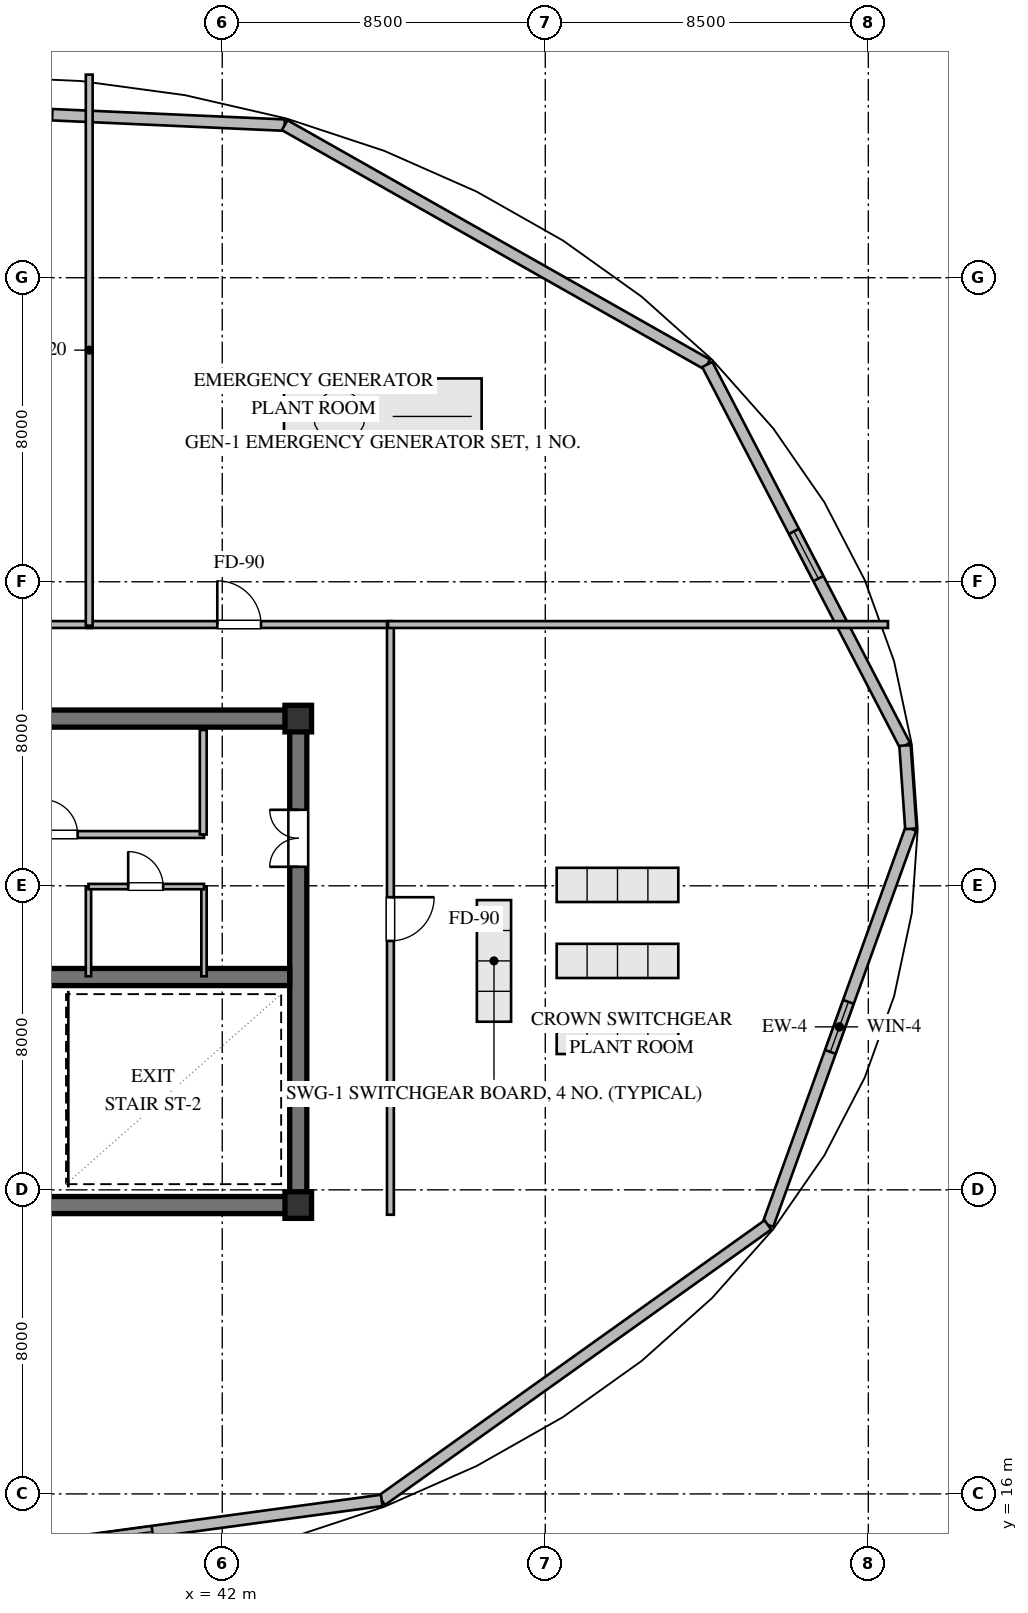
"""IFC4 building model, lengths in metres.
Left out: names, types, materials, properties, quantities, classifications, styles, units other than length and angle.
Written with IfcOpenShell. Run it as: python <this file> out.ifc"""

import sys

from ifc_helpers import new_model, si_unit, direction, frame, frame_2d, origin, origin_2d, place, context, subcontext, project, spatial, rectangle, extrude, element, fill, save


model = new_model("IFC4")
c1 = context("Model", 3, precision=1e-05, world=origin(), true_north=direction((0.0, 1.0)))
c2 = subcontext(c1, "Body", "Model", "MODEL_VIEW")
j1 = project(units=[si_unit("LENGTHUNIT", "METRE"), si_unit("PLANEANGLEUNIT", "RADIAN")], contexts=[c1])
p1 = place(None, origin())
s1 = spatial("IfcSite", under=j1, at=p1, CompositionType="ELEMENT")
p2 = place(p1, origin())
s2 = spatial("IfcBuilding", under=s1, at=p2, CompositionType="ELEMENT")
p3 = place(p2, frame((0.0, 0.0, 308.8)))
s3 = spatial("IfcBuildingStorey", under=s2, at=p3, CompositionType="ELEMENT", Elevation=308.8)
for number, where, z_axis, x_axis in (
    (1, (21.775, 23.6, 0.0), (0.0, 0.0, 1.0), (1.0, 0.0, 0.0)),
    (2, (21.775, 36.4, 0.0), (0.0, 0.0, 1.0), (1.0, 0.0, 0.0)),
):
    element("IfcWall", number, at=place(p3, frame(where, z_axis=z_axis, x_axis=x_axis)), inside=s3, PredefinedType="SHEAR", context=c2, shape_type="SweptSolid", body=[
        extrude(rectangle(XDim=22.45, YDim=0.45, at=frame_2d((11.225, 0.0))), origin(), (0.0, 0.0, 1.0), 3.7),
    ])
p4 = place(p3, frame((44.0, 23.825, 0.0), z_axis=(0.0, 0.0, 1.0), x_axis=(0.0, 1.0, 0.0)))
e3 = element("IfcWall", 3, at=p4, inside=s3, PredefinedType="SHEAR", context=c2, shape_type="SweptSolid", body=[
    extrude(rectangle(XDim=12.35, YDim=0.45, at=frame_2d((6.175, 0.0))), origin(), (0.0, 0.0, 1.0), 3.7),
])
p5 = place(p4, frame((8.675, 0.0, 0.0)))
e4 = element("IfcOpeningElement", 4, at=p5, cuts=e3, PredefinedType="OPENING", context=c2, shape_type="SweptSolid", body=[
    extrude(rectangle(XDim=1.5, YDim=2.15, at=frame_2d((0.75, 1.075))), frame((0.0, 0.235, 0.0), z_axis=(0.0, -1.0, 0.0), x_axis=(1.0, 0.0, 0.0)), (0.0, 0.0, 1.0), 0.47),
])
p6 = place(p3, frame((22.225, 29.6, 0.0), z_axis=(0.0, 0.0, 1.0), x_axis=(1.0, 0.0, 0.0)))
e5 = element("IfcWall", 5, at=p6, inside=s3, PredefinedType="SHEAR", context=c2, shape_type="SweptSolid", body=[
    extrude(rectangle(XDim=21.55, YDim=0.45, at=frame_2d((10.775, 0.0))), origin(), (0.0, 0.0, 1.0), 3.7),
])
p7 = place(p6, frame((12.225, 0.0, 0.0)))
e6 = element("IfcOpeningElement", 6, at=p7, cuts=e5, PredefinedType="OPENING", context=c2, shape_type="SweptSolid", body=[
    extrude(rectangle(XDim=1.15, YDim=2.1, at=frame_2d((0.575, 1.05))), frame((0.0, 0.235, 0.0), z_axis=(0.0, -1.0, 0.0), x_axis=(1.0, 0.0, 0.0)), (0.0, 0.0, 1.0), 0.47),
])
for number, where, z_axis, x_axis in (
    (7, (44.0, 23.6, 0.0), (0.0, 0.0, 1.0), (1.0, 0.0, 0.0)),
    (8, (44.0, 36.4, 0.0), (0.0, 0.0, 1.0), (1.0, 0.0, 0.0)),
):
    element("IfcColumn", number, at=place(p3, frame(where, z_axis=z_axis, x_axis=x_axis)), inside=s3, PredefinedType="COLUMN", context=c2, shape_type="SweptSolid", body=[
        extrude(rectangle(XDim=0.7, YDim=0.7, at=origin_2d()), origin(), (0.0, 0.0, 1.0), 4.0),
    ])
p8 = place(p3, frame((60.12, 33.5, 0.0), z_axis=(0.0, 0.0, 1.0), x_axis=(-0.339587618367, -0.940574425259, 0.0)))
e9 = element("IfcWall", 9, at=p8, inside=s3, PredefinedType="STANDARD", context=c2, shape_type="SweptSolid", body=[
    extrude(rectangle(XDim=11.082, YDim=0.3, at=frame_2d((5.541, 0.0))), origin(), (0.0, 0.0, 1.0), 3.7),
])
p9 = place(p8, frame((4.841, 0.0, 1.2)))
e10 = element("IfcOpeningElement", 10, at=p9, cuts=e9, PredefinedType="OPENING", context=c2, shape_type="SweptSolid", body=[
    extrude(rectangle(XDim=1.4, YDim=1.2, at=frame_2d((0.7, 0.6))), frame((0.0, 0.16, 0.0), z_axis=(0.0, -1.0, 0.0), x_axis=(1.0, 0.0, 0.0)), (0.0, 0.0, 1.0), 0.32),
])
p10 = place(p3, frame((56.357, 23.077, 0.0), z_axis=(0.0, 0.0, 1.0), x_axis=(-0.814111303181, -0.580708865123, 0.0)))
e11 = element("IfcWall", 11, at=p10, inside=s3, PredefinedType="STANDARD", context=c2, shape_type="SweptSolid", body=[
    extrude(rectangle(XDim=12.481, YDim=0.3, at=frame_2d((6.24, 0.0))), origin(), (0.0, 0.0, 1.0), 3.7),
])
p11 = place(p3, frame((46.196, 15.829, 0.0), z_axis=(0.0, 0.0, 1.0), x_axis=(-0.990927056791, -0.134400774248, 0.0)))
e12 = element("IfcWall", 12, at=p11, inside=s3, PredefinedType="STANDARD", context=c2, shape_type="SweptSolid", body=[
    extrude(rectangle(XDim=13.58, YDim=0.3, at=frame_2d((6.79, 0.0))), origin(), (0.0, 0.0, 1.0), 3.7),
])
p12 = place(p11, frame((6.09, 0.0, 1.2)))
e13 = element("IfcOpeningElement", 13, at=p12, cuts=e12, PredefinedType="OPENING", context=c2, shape_type="SweptSolid", body=[
    extrude(rectangle(XDim=1.4, YDim=1.2, at=frame_2d((0.7, 0.6))), frame((0.0, 0.16, 0.0), z_axis=(0.0, -1.0, 0.0), x_axis=(1.0, 0.0, 0.0)), (0.0, 0.0, 1.0), 0.32),
])
p13 = place(p3, frame((30.014, 52.626, 0.0), z_axis=(0.0, 0.0, 1.0), x_axis=(0.998996211569, -0.04479474602, 0.0)))
e14 = element("IfcWall", 14, at=p13, inside=s3, PredefinedType="STANDARD", context=c2, shape_type="SweptSolid", body=[
    extrude(rectangle(XDim=13.642, YDim=0.3, at=frame_2d((6.821, 0.0))), origin(), (0.0, 0.0, 1.0), 3.7),
])
p14 = place(p13, frame((6.121, 0.0, 1.2)))
e15 = element("IfcOpeningElement", 15, at=p14, cuts=e14, PredefinedType="OPENING", context=c2, shape_type="SweptSolid", body=[
    extrude(rectangle(XDim=1.4, YDim=1.2, at=frame_2d((0.7, 0.6))), frame((0.0, 0.16, 0.0), z_axis=(0.0, -1.0, 0.0), x_axis=(1.0, 0.0, 0.0)), (0.0, 0.0, 1.0), 0.32),
])
p15 = place(p3, frame((43.642, 52.015, 0.0), z_axis=(0.0, 0.0, 1.0), x_axis=(0.870169378253, -0.492752730232, 0.0)))
e16 = element("IfcWall", 16, at=p15, inside=s3, PredefinedType="STANDARD", context=c2, shape_type="SweptSolid", body=[
    extrude(rectangle(XDim=12.779, YDim=0.3, at=frame_2d((6.39, 0.0))), origin(), (0.0, 0.0, 1.0), 3.7),
])
p16 = place(p3, frame((54.762, 45.718, 0.0), z_axis=(0.0, 0.0, 1.0), x_axis=(0.460623742834, -0.8875954977, 0.0)))
e17 = element("IfcWall", 17, at=p16, inside=s3, PredefinedType="STANDARD", context=c2, shape_type="SweptSolid", body=[
    extrude(rectangle(XDim=11.296, YDim=0.3, at=frame_2d((5.648, 0.0))), origin(), (0.0, 0.0, 1.0), 3.7),
])
p17 = place(p16, frame((4.948, 0.0, 1.2)))
e18 = element("IfcOpeningElement", 18, at=p17, cuts=e17, PredefinedType="OPENING", context=c2, shape_type="SweptSolid", body=[
    extrude(rectangle(XDim=1.4, YDim=1.2, at=frame_2d((0.7, 0.6))), frame((0.0, 0.16, 0.0), z_axis=(0.0, -1.0, 0.0), x_axis=(1.0, 0.0, 0.0)), (0.0, 0.0, 1.0), 0.32),
])
p18 = place(p3, frame((59.965, 35.692, 0.0), z_axis=(0.0, 0.0, 1.0), x_axis=(0.070552198309, -0.997508088846, 0.0)))
e19 = element("IfcWall", 19, at=p18, inside=s3, PredefinedType="STANDARD", context=c2, shape_type="SweptSolid", body=[
    extrude(rectangle(XDim=2.197, YDim=0.3, at=frame_2d((1.099, 0.0))), origin(), (0.0, 0.0, 1.0), 3.7),
])
p19 = place(p3, frame((33.98, 33.35, 0.0), z_axis=(0.0, 0.0, 1.0), x_axis=(1.0, 0.0, 0.0)))
e20 = element("IfcWall", 20, at=p19, inside=s3, PredefinedType="PARTITIONING", context=c2, shape_type="SweptSolid", body=[
    extrude(rectangle(XDim=7.54, YDim=0.18, at=frame_2d((3.77, 0.0))), origin(), (0.0, 0.0, 1.0), 3.7),
])
p20 = place(p19, frame((3.295, 0.0, 0.0)))
e21 = element("IfcOpeningElement", 21, at=p20, cuts=e20, PredefinedType="OPENING", context=c2, shape_type="SweptSolid", body=[
    extrude(rectangle(XDim=0.92, YDim=2.1, at=frame_2d((0.46, 1.05))), frame((0.0, 0.1, 0.0), z_axis=(0.0, -1.0, 0.0), x_axis=(1.0, 0.0, 0.0)), (0.0, 0.0, 1.0), 0.2),
])
p21 = place(p3, frame((41.5, 33.35, 0.0), z_axis=(0.0, 0.0, 1.0), x_axis=(0.0, 1.0, 0.0)))
e22 = element("IfcWall", 22, at=p21, inside=s3, PredefinedType="PARTITIONING", context=c2, shape_type="SweptSolid", body=[
    extrude(rectangle(XDim=2.75, YDim=0.18, at=frame_2d((1.375, 0.0))), origin(), (0.0, 0.0, 1.0), 3.7),
])
for number, where, z_axis, x_axis in (
    (23, (38.48, 29.62, 0.0), (0.0, 0.0, 1.0), (0.0, 1.0, 0.0)),
    (24, (41.52, 29.62, 0.0), (0.0, 0.0, 1.0), (0.0, 1.0, 0.0)),
):
    element("IfcWall", number, at=place(p3, frame(where, z_axis=z_axis, x_axis=x_axis)), inside=s3, PredefinedType="PARTITIONING", context=c2, shape_type="SweptSolid", body=[
        extrude(rectangle(XDim=2.36, YDim=0.14, at=frame_2d((1.18, 0.0))), origin(), (0.0, 0.0, 1.0), 3.7),
    ])
p22 = place(p3, frame((38.48, 31.98, 0.0), z_axis=(0.0, 0.0, 1.0), x_axis=(1.0, 0.0, 0.0)))
e25 = element("IfcWall", 25, at=p22, inside=s3, PredefinedType="PARTITIONING", context=c2, shape_type="SweptSolid", body=[
    extrude(rectangle(XDim=3.04, YDim=0.14, at=frame_2d((1.52, 0.0))), origin(), (0.0, 0.0, 1.0), 3.7),
])
p23 = place(p22, frame((1.045, 0.0, 0.0)))
e26 = element("IfcOpeningElement", 26, at=p23, cuts=e25, PredefinedType="OPENING", context=c2, shape_type="SweptSolid", body=[
    extrude(rectangle(XDim=0.92, YDim=2.1, at=frame_2d((0.46, 1.05))), frame((0.0, 0.08, 0.0), z_axis=(0.0, -1.0, 0.0), x_axis=(1.0, 0.0, 0.0)), (0.0, 0.0, 1.0), 0.16),
])
p24 = place(p3, frame((21.745, 38.875, 0.0), z_axis=(0.0, 0.0, 1.0), x_axis=(1.0, 0.0, 0.0)))
e27 = element("IfcWall", 27, at=p24, inside=s3, PredefinedType="PARTITIONING", context=c2, shape_type="SweptSolid", body=[
    extrude(rectangle(XDim=16.82, YDim=0.18, at=frame_2d((8.41, 0.0))), origin(), (0.0, 0.0, 1.0), 3.7),
])
p25 = place(p24, frame((7.835, 0.0, 0.0)))
e28 = element("IfcOpeningElement", 28, at=p25, cuts=e27, PredefinedType="OPENING", context=c2, shape_type="SweptSolid", body=[
    extrude(rectangle(XDim=1.15, YDim=2.1, at=frame_2d((0.575, 1.05))), frame((0.0, 0.1, 0.0), z_axis=(0.0, -1.0, 0.0), x_axis=(1.0, 0.0, 0.0)), (0.0, 0.0, 1.0), 0.2),
])
p26 = place(p3, frame((38.435, 38.875, 0.0), z_axis=(0.0, 0.0, 1.0), x_axis=(1.0, 0.0, 0.0)))
e29 = element("IfcWall", 29, at=p26, inside=s3, PredefinedType="PARTITIONING", context=c2, shape_type="SweptSolid", body=[
    extrude(rectangle(XDim=8.02, YDim=0.18, at=frame_2d((4.01, 0.0))), origin(), (0.0, 0.0, 1.0), 3.7),
])
p27 = place(p26, frame((3.435, 0.0, 0.0)))
e30 = element("IfcOpeningElement", 30, at=p27, cuts=e29, PredefinedType="OPENING", context=c2, shape_type="SweptSolid", body=[
    extrude(rectangle(XDim=1.15, YDim=2.1, at=frame_2d((0.575, 1.05))), frame((0.0, 0.1, 0.0), z_axis=(0.0, -1.0, 0.0), x_axis=(1.0, 0.0, 0.0)), (0.0, 0.0, 1.0), 0.2),
])
p28 = place(p3, frame((46.425, 38.905, 0.0), z_axis=(0.0, 0.0, 1.0), x_axis=(0.0, -1.0, 0.0)))
e31 = element("IfcWall", 31, at=p28, inside=s3, PredefinedType="PARTITIONING", context=c2, shape_type="SweptSolid", body=[
    extrude(rectangle(XDim=15.56, YDim=0.18, at=frame_2d((7.78, 0.0))), origin(), (0.0, 0.0, 1.0), 3.7),
])
p29 = place(p28, frame((7.205, 0.0, 0.0)))
e32 = element("IfcOpeningElement", 32, at=p29, cuts=e31, PredefinedType="OPENING", context=c2, shape_type="SweptSolid", body=[
    extrude(rectangle(XDim=1.15, YDim=2.1, at=frame_2d((0.575, 1.05))), frame((0.0, 0.1, 0.0), z_axis=(0.0, -1.0, 0.0), x_axis=(1.0, 0.0, 0.0)), (0.0, 0.0, 1.0), 0.2),
])
p30 = place(p3, frame((38.5, 53.344, 0.0), z_axis=(0.0, 0.0, 1.0), x_axis=(0.0, -1.0, 0.0)))
e33 = element("IfcWall", 33, at=p30, inside=s3, PredefinedType="PARTITIONING", context=c2, shape_type="SweptSolid", body=[
    extrude(rectangle(XDim=14.499, YDim=0.18, at=frame_2d((7.25, 0.0))), origin(), (0.0, 0.0, 1.0), 3.7),
])
p31 = place(p3, frame((59.517, 38.875, 0.0), z_axis=(0.0, 0.0, 1.0), x_axis=(-1.0, 0.0, 0.0)))
e34 = element("IfcWall", 34, at=p31, inside=s3, PredefinedType="PARTITIONING", context=c2, shape_type="SweptSolid", body=[
    extrude(rectangle(XDim=13.157, YDim=0.18, at=frame_2d((6.579, 0.0))), origin(), (0.0, 0.0, 1.0), 3.7),
])
p32 = place(p9, origin())
e35 = element("IfcWindow", 35, at=p32, inside=s3, PartitioningType="SINGLE_PANEL", PredefinedType="WINDOW", context=c2, shape_type="SweptSolid", body=[
    extrude(rectangle(XDim=1.4, YDim=1.2, at=frame_2d((0.7, 0.6))), frame((0.0, 0.03, 0.0), z_axis=(0.0, -1.0, 0.0), x_axis=(1.0, 0.0, 0.0)), (0.0, 0.0, 1.0), 0.06),
])
fill(e10, e35)
p33 = place(p12, origin())
e36 = element("IfcWindow", 36, at=p33, inside=s3, PartitioningType="SINGLE_PANEL", PredefinedType="WINDOW", context=c2, shape_type="SweptSolid", body=[
    extrude(rectangle(XDim=1.4, YDim=1.2, at=frame_2d((0.7, 0.6))), frame((0.0, 0.03, 0.0), z_axis=(0.0, -1.0, 0.0), x_axis=(1.0, 0.0, 0.0)), (0.0, 0.0, 1.0), 0.06),
])
fill(e13, e36)
p34 = place(p14, origin())
e37 = element("IfcWindow", 37, at=p34, inside=s3, PartitioningType="SINGLE_PANEL", PredefinedType="WINDOW", context=c2, shape_type="SweptSolid", body=[
    extrude(rectangle(XDim=1.4, YDim=1.2, at=frame_2d((0.7, 0.6))), frame((0.0, 0.03, 0.0), z_axis=(0.0, -1.0, 0.0), x_axis=(1.0, 0.0, 0.0)), (0.0, 0.0, 1.0), 0.06),
])
fill(e15, e37)
p35 = place(p17, origin())
e38 = element("IfcWindow", 38, at=p35, inside=s3, PartitioningType="SINGLE_PANEL", PredefinedType="WINDOW", context=c2, shape_type="SweptSolid", body=[
    extrude(rectangle(XDim=1.4, YDim=1.2, at=frame_2d((0.7, 0.6))), frame((0.0, 0.03, 0.0), z_axis=(0.0, -1.0, 0.0), x_axis=(1.0, 0.0, 0.0)), (0.0, 0.0, 1.0), 0.06),
])
fill(e18, e38)
p36 = place(p5, origin())
e39 = element("IfcDoor", 39, at=p36, inside=s3, OperationType="DOUBLE_DOOR_SINGLE_SWING", PredefinedType="DOOR", context=c2, shape_type="SweptSolid", body=[
    extrude(rectangle(XDim=1.5, YDim=2.15, at=frame_2d((0.75, 1.075))), frame((0.0, 0.025, 0.0), z_axis=(0.0, -1.0, 0.0), x_axis=(1.0, 0.0, 0.0)), (0.0, 0.0, 1.0), 0.05),
])
fill(e4, e39)
p37 = place(p20, origin())
e40 = element("IfcDoor", 40, at=p37, inside=s3, OperationType="SINGLE_SWING_LEFT", PredefinedType="DOOR", context=c2, shape_type="SweptSolid", body=[
    extrude(rectangle(XDim=0.92, YDim=2.1, at=frame_2d((0.46, 1.05))), frame((0.0, 0.025, 0.0), z_axis=(0.0, -1.0, 0.0), x_axis=(1.0, 0.0, 0.0)), (0.0, 0.0, 1.0), 0.05),
])
fill(e21, e40)
p38 = place(p23, origin())
e41 = element("IfcDoor", 41, at=p38, inside=s3, OperationType="SINGLE_SWING_LEFT", PredefinedType="DOOR", context=c2, shape_type="SweptSolid", body=[
    extrude(rectangle(XDim=0.92, YDim=2.1, at=frame_2d((0.46, 1.05))), frame((0.0, 0.025, 0.0), z_axis=(0.0, -1.0, 0.0), x_axis=(1.0, 0.0, 0.0)), (0.0, 0.0, 1.0), 0.05),
])
fill(e26, e41)
p39 = place(p27, origin())
e42 = element("IfcDoor", 42, at=p39, inside=s3, OperationType="SINGLE_SWING_LEFT", PredefinedType="DOOR", context=c2, shape_type="SweptSolid", body=[
    extrude(rectangle(XDim=1.15, YDim=2.1, at=frame_2d((0.575, 1.05))), frame((0.0, 0.025, 0.0), z_axis=(0.0, -1.0, 0.0), x_axis=(1.0, 0.0, 0.0)), (0.0, 0.0, 1.0), 0.05),
])
fill(e30, e42)
p40 = place(p29, origin())
e43 = element("IfcDoor", 43, at=p40, inside=s3, OperationType="SINGLE_SWING_LEFT", PredefinedType="DOOR", context=c2, shape_type="SweptSolid", body=[
    extrude(rectangle(XDim=1.15, YDim=2.1, at=frame_2d((0.575, 1.05))), frame((0.0, 0.025, 0.0), z_axis=(0.0, -1.0, 0.0), x_axis=(1.0, 0.0, 0.0)), (0.0, 0.0, 1.0), 0.05),
])
fill(e32, e43)
save(model, sys.argv[1])
